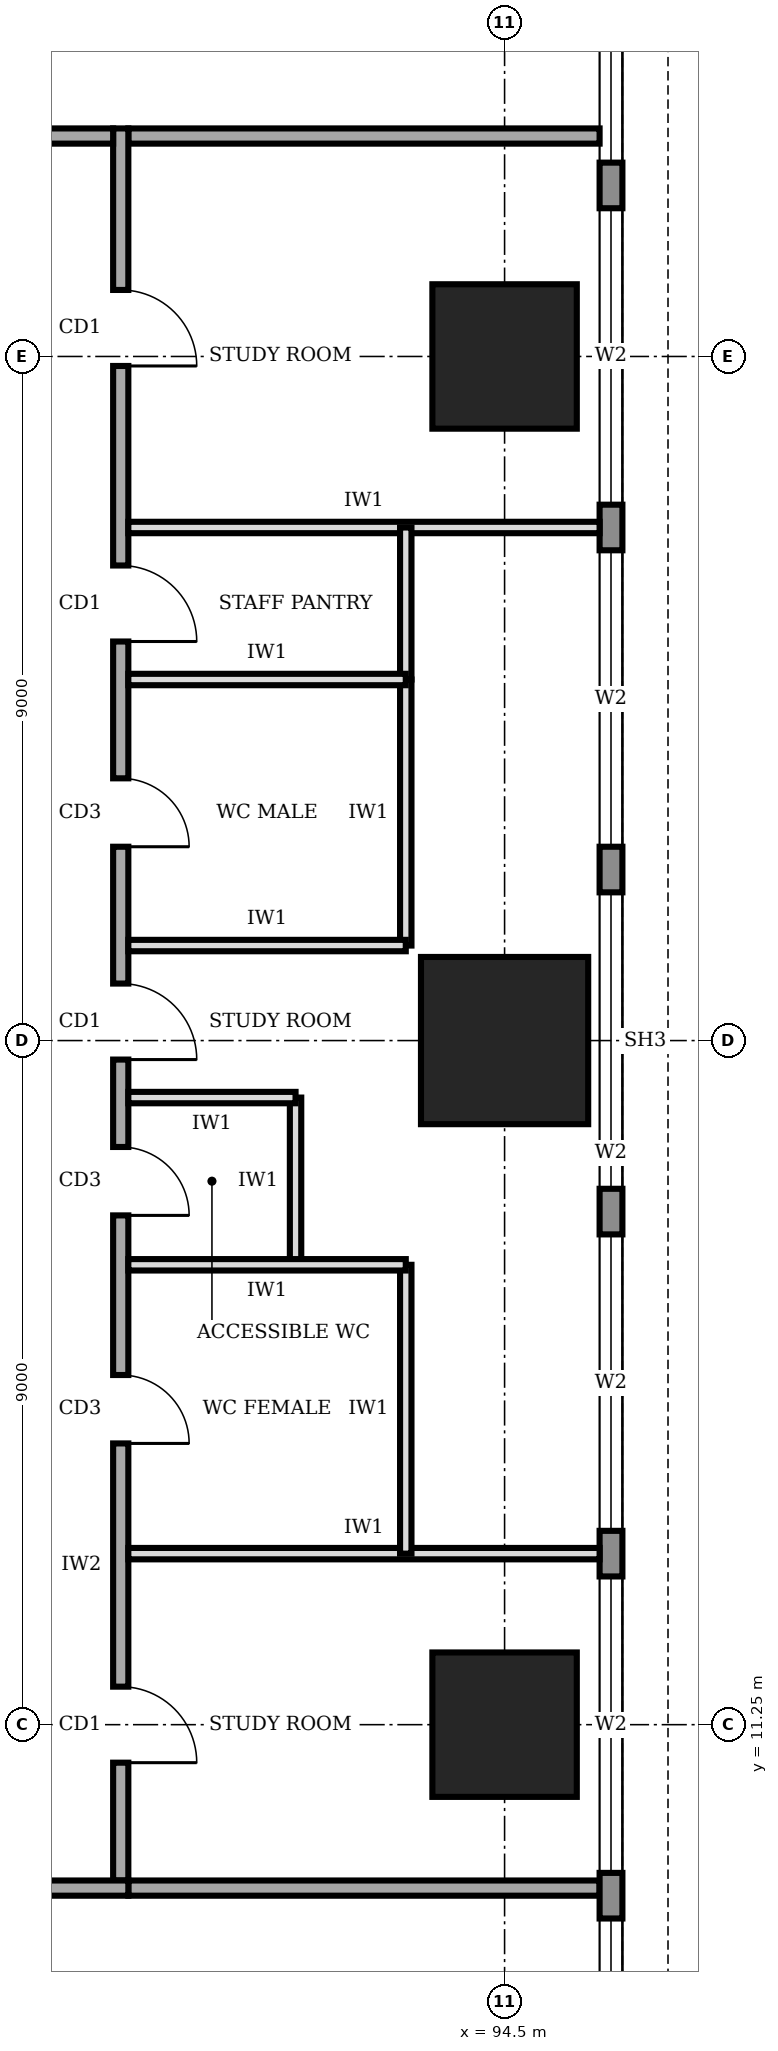
"""IFC4 building model, lengths in metres.
Left out: names, types, materials, properties, quantities, classifications, styles, units other than length and angle.
Written with IfcOpenShell. Run it as: python <this file> out.ifc"""

import sys

from ifc_helpers import new_model, si_unit, direction, frame, frame_2d, origin, origin_2d, place, context, subcontext, project, spatial, rectangle, extrude, element, fill, save


model = new_model("IFC4")
c1 = context("Model", 3, precision=1e-05, world=origin(), true_north=direction((0.0, 1.0)))
c2 = subcontext(c1, "Body", "Model", "MODEL_VIEW")
j1 = project(units=[si_unit("LENGTHUNIT", "METRE"), si_unit("PLANEANGLEUNIT", "RADIAN")], contexts=[c1])
p1 = place(None, origin())
s1 = spatial("IfcSite", under=j1, at=p1, CompositionType="ELEMENT")
p2 = place(p1, origin())
s2 = spatial("IfcBuilding", under=s1, at=p2, CompositionType="ELEMENT")
p3 = place(p2, frame((0.0, 0.0, 161.0)))
s3 = spatial("IfcBuildingStorey", under=s2, at=p3, CompositionType="ELEMENT", Elevation=161.0)
p4 = place(p3, frame((94.5, 11.25, 0.0), z_axis=(0.0, 0.0, 1.0), x_axis=(1.0, 0.0, 0.0)))
e1 = element("IfcColumn", 1, at=p4, inside=s3, PredefinedType="COLUMN", context=c2, shape_type="SweptSolid", body=[
    extrude(rectangle(XDim=1.9, YDim=1.9, at=origin_2d()), origin(), (0.0, 0.0, 1.0), 4.0),
])
p5 = place(p3, frame((94.5, 20.25, 0.0), z_axis=(0.0, 0.0, 1.0), x_axis=(1.0, 0.0, 0.0)))
e2 = element("IfcColumn", 2, at=p5, inside=s3, PredefinedType="COLUMN", context=c2, shape_type="SweptSolid", body=[
    extrude(rectangle(XDim=2.2, YDim=2.2, at=origin_2d()), origin(), (0.0, 0.0, 1.0), 4.0),
])
p6 = place(p3, frame((94.5, 29.25, 0.0), z_axis=(0.0, 0.0, 1.0), x_axis=(1.0, 0.0, 0.0)))
e3 = element("IfcColumn", 3, at=p6, inside=s3, PredefinedType="COLUMN", context=c2, shape_type="SweptSolid", body=[
    extrude(rectangle(XDim=1.9, YDim=1.9, at=origin_2d()), origin(), (0.0, 0.0, 1.0), 4.0),
])
p7 = place(p3, frame((95.9, 3.32, 0.0), z_axis=(0.0, 0.0, 1.0), x_axis=(0.0, 1.0, 0.0)))
e4 = element("IfcWall", 4, at=p7, inside=s3, PredefinedType="STANDARD", context=c2, shape_type="SweptSolid", body=[
    extrude(rectangle(XDim=33.86, YDim=0.3, at=frame_2d((16.93, 0.0))), origin(), (0.0, 0.0, 1.0), 3.75),
])
p8 = place(p7, frame((1.48, 0.0, 0.6)))
e5 = element("IfcOpeningElement", 5, at=p8, cuts=e4, PredefinedType="OPENING", context=c2, shape_type="SweptSolid", body=[
    extrude(rectangle(XDim=3.9, YDim=2.6, at=frame_2d((1.95, 1.3))), frame((0.0, 0.16, 0.0), z_axis=(0.0, -1.0, 0.0), x_axis=(1.0, 0.0, 0.0)), (0.0, 0.0, 1.0), 0.32),
])
p9 = place(p7, frame((5.98, 0.0, 0.6)))
e6 = element("IfcOpeningElement", 6, at=p9, cuts=e4, PredefinedType="OPENING", context=c2, shape_type="SweptSolid", body=[
    extrude(rectangle(XDim=3.9, YDim=2.6, at=frame_2d((1.95, 1.3))), frame((0.0, 0.16, 0.0), z_axis=(0.0, -1.0, 0.0), x_axis=(1.0, 0.0, 0.0)), (0.0, 0.0, 1.0), 0.32),
])
p10 = place(p7, frame((10.48, 0.0, 0.6)))
e7 = element("IfcOpeningElement", 7, at=p10, cuts=e4, PredefinedType="OPENING", context=c2, shape_type="SweptSolid", body=[
    extrude(rectangle(XDim=3.9, YDim=2.6, at=frame_2d((1.95, 1.3))), frame((0.0, 0.16, 0.0), z_axis=(0.0, -1.0, 0.0), x_axis=(1.0, 0.0, 0.0)), (0.0, 0.0, 1.0), 0.32),
])
p11 = place(p7, frame((14.98, 0.0, 0.6)))
e8 = element("IfcOpeningElement", 8, at=p11, cuts=e4, PredefinedType="OPENING", context=c2, shape_type="SweptSolid", body=[
    extrude(rectangle(XDim=3.9, YDim=2.6, at=frame_2d((1.95, 1.3))), frame((0.0, 0.16, 0.0), z_axis=(0.0, -1.0, 0.0), x_axis=(1.0, 0.0, 0.0)), (0.0, 0.0, 1.0), 0.32),
])
p12 = place(p7, frame((19.48, 0.0, 0.6)))
e9 = element("IfcOpeningElement", 9, at=p12, cuts=e4, PredefinedType="OPENING", context=c2, shape_type="SweptSolid", body=[
    extrude(rectangle(XDim=3.9, YDim=2.6, at=frame_2d((1.95, 1.3))), frame((0.0, 0.16, 0.0), z_axis=(0.0, -1.0, 0.0), x_axis=(1.0, 0.0, 0.0)), (0.0, 0.0, 1.0), 0.32),
])
p13 = place(p7, frame((23.98, 0.0, 0.6)))
e10 = element("IfcOpeningElement", 10, at=p13, cuts=e4, PredefinedType="OPENING", context=c2, shape_type="SweptSolid", body=[
    extrude(rectangle(XDim=3.9, YDim=2.6, at=frame_2d((1.95, 1.3))), frame((0.0, 0.16, 0.0), z_axis=(0.0, -1.0, 0.0), x_axis=(1.0, 0.0, 0.0)), (0.0, 0.0, 1.0), 0.32),
])
p14 = place(p7, frame((28.48, 0.0, 0.6)))
e11 = element("IfcOpeningElement", 11, at=p14, cuts=e4, PredefinedType="OPENING", context=c2, shape_type="SweptSolid", body=[
    extrude(rectangle(XDim=3.9, YDim=2.6, at=frame_2d((1.95, 1.3))), frame((0.0, 0.16, 0.0), z_axis=(0.0, -1.0, 0.0), x_axis=(1.0, 0.0, 0.0)), (0.0, 0.0, 1.0), 0.32),
])
p15 = place(p3, frame((63.3, 9.1, 0.0), z_axis=(0.0, 0.0, 1.0), x_axis=(1.0, 0.0, 0.0)))
e12 = element("IfcWall", 12, at=p15, inside=s3, PredefinedType="SOLIDWALL", context=c2, shape_type="SweptSolid", body=[
    extrude(rectangle(XDim=26.25, YDim=0.2, at=frame_2d((13.125, 0.0))), origin(), (0.0, 0.0, 1.0), 3.75),
])
p16 = place(p15, frame((12.425, 0.0, 0.0)))
e13 = element("IfcOpeningElement", 13, at=p16, cuts=e12, PredefinedType="OPENING", context=c2, shape_type="SweptSolid", body=[
    extrude(rectangle(XDim=1.4, YDim=2.1, at=frame_2d((0.7, 1.05))), frame((0.0, 0.11, 0.0), z_axis=(0.0, -1.0, 0.0), x_axis=(1.0, 0.0, 0.0)), (0.0, 0.0, 1.0), 0.22),
])
p17 = place(p3, frame((89.45, 9.2, 0.0), z_axis=(0.0, 0.0, 1.0), x_axis=(0.0, 1.0, 0.0)))
e14 = element("IfcWall", 14, at=p17, inside=s3, PredefinedType="SOLIDWALL", context=c2, shape_type="SweptSolid", body=[
    extrude(rectangle(XDim=23.05, YDim=0.2, at=frame_2d((11.525, 0.0))), origin(), (0.0, 0.0, 1.0), 3.75),
])
p18 = place(p17, frame((1.55, 0.0, 0.0)))
e15 = element("IfcOpeningElement", 15, at=p18, cuts=e14, PredefinedType="OPENING", context=c2, shape_type="SweptSolid", body=[
    extrude(rectangle(XDim=1.0, YDim=2.1, at=frame_2d((0.5, 1.05))), frame((0.0, 0.11, 0.0), z_axis=(0.0, -1.0, 0.0), x_axis=(1.0, 0.0, 0.0)), (0.0, 0.0, 1.0), 0.22),
])
p19 = place(p17, frame((5.75, 0.0, 0.0)))
e16 = element("IfcOpeningElement", 16, at=p19, cuts=e14, PredefinedType="OPENING", context=c2, shape_type="SweptSolid", body=[
    extrude(rectangle(XDim=0.9, YDim=2.1, at=frame_2d((0.45, 1.05))), frame((0.0, 0.11, 0.0), z_axis=(0.0, -1.0, 0.0), x_axis=(1.0, 0.0, 0.0)), (0.0, 0.0, 1.0), 0.22),
])
p20 = place(p17, frame((8.75, 0.0, 0.0)))
e17 = element("IfcOpeningElement", 17, at=p20, cuts=e14, PredefinedType="OPENING", context=c2, shape_type="SweptSolid", body=[
    extrude(rectangle(XDim=0.9, YDim=2.1, at=frame_2d((0.45, 1.05))), frame((0.0, 0.11, 0.0), z_axis=(0.0, -1.0, 0.0), x_axis=(1.0, 0.0, 0.0)), (0.0, 0.0, 1.0), 0.22),
])
p21 = place(p17, frame((13.6, 0.0, 0.0)))
e18 = element("IfcOpeningElement", 18, at=p21, cuts=e14, PredefinedType="OPENING", context=c2, shape_type="SweptSolid", body=[
    extrude(rectangle(XDim=0.9, YDim=2.1, at=frame_2d((0.45, 1.05))), frame((0.0, 0.11, 0.0), z_axis=(0.0, -1.0, 0.0), x_axis=(1.0, 0.0, 0.0)), (0.0, 0.0, 1.0), 0.22),
])
p22 = place(p17, frame((16.3, 0.0, 0.0)))
e19 = element("IfcOpeningElement", 19, at=p22, cuts=e14, PredefinedType="OPENING", context=c2, shape_type="SweptSolid", body=[
    extrude(rectangle(XDim=1.0, YDim=2.1, at=frame_2d((0.5, 1.05))), frame((0.0, 0.11, 0.0), z_axis=(0.0, -1.0, 0.0), x_axis=(1.0, 0.0, 0.0)), (0.0, 0.0, 1.0), 0.22),
])
p23 = place(p17, frame((10.8, 0.0, 0.0)))
e20 = element("IfcOpeningElement", 20, at=p23, cuts=e14, PredefinedType="OPENING", context=c2, shape_type="SweptSolid", body=[
    extrude(rectangle(XDim=1.0, YDim=2.1, at=frame_2d((0.5, 1.05))), frame((0.0, 0.11, 0.0), z_axis=(0.0, -1.0, 0.0), x_axis=(1.0, 0.0, 0.0)), (0.0, 0.0, 1.0), 0.22),
])
p24 = place(p17, frame((19.925, 0.0, 0.0)))
e21 = element("IfcOpeningElement", 21, at=p24, cuts=e14, PredefinedType="OPENING", context=c2, shape_type="SweptSolid", body=[
    extrude(rectangle(XDim=1.0, YDim=2.1, at=frame_2d((0.5, 1.05))), frame((0.0, 0.11, 0.0), z_axis=(0.0, -1.0, 0.0), x_axis=(1.0, 0.0, 0.0)), (0.0, 0.0, 1.0), 0.22),
])
p25 = place(p3, frame((89.35, 32.15, 0.0), z_axis=(0.0, 0.0, 1.0), x_axis=(-1.0, 0.0, 0.0)))
e22 = element("IfcWall", 22, at=p25, inside=s3, PredefinedType="SOLIDWALL", context=c2, shape_type="SweptSolid", body=[
    extrude(rectangle(XDim=26.05, YDim=0.2, at=frame_2d((13.025, 0.0))), origin(), (0.0, 0.0, 1.0), 3.75),
])
p26 = place(p25, frame((19.05, 0.0, 0.0)))
e23 = element("IfcOpeningElement", 23, at=p26, cuts=e22, PredefinedType="OPENING", context=c2, shape_type="SweptSolid", body=[
    extrude(rectangle(XDim=1.0, YDim=2.1, at=frame_2d((0.5, 1.05))), frame((0.0, 0.11, 0.0), z_axis=(0.0, -1.0, 0.0), x_axis=(1.0, 0.0, 0.0)), (0.0, 0.0, 1.0), 0.22),
])
p27 = place(p25, frame((10.1, 0.0, 0.0)))
e24 = element("IfcOpeningElement", 24, at=p27, cuts=e22, PredefinedType="OPENING", context=c2, shape_type="SweptSolid", body=[
    extrude(rectangle(XDim=1.0, YDim=2.1, at=frame_2d((0.5, 1.05))), frame((0.0, 0.11, 0.0), z_axis=(0.0, -1.0, 0.0), x_axis=(1.0, 0.0, 0.0)), (0.0, 0.0, 1.0), 0.22),
])
p28 = place(p25, frame((5.6, 0.0, 0.0)))
e25 = element("IfcOpeningElement", 25, at=p28, cuts=e22, PredefinedType="OPENING", context=c2, shape_type="SweptSolid", body=[
    extrude(rectangle(XDim=1.0, YDim=2.1, at=frame_2d((0.5, 1.05))), frame((0.0, 0.11, 0.0), z_axis=(0.0, -1.0, 0.0), x_axis=(1.0, 0.0, 0.0)), (0.0, 0.0, 1.0), 0.22),
])
p29 = place(p25, frame((1.325, 0.0, 0.0)))
e26 = element("IfcOpeningElement", 26, at=p29, cuts=e22, PredefinedType="OPENING", context=c2, shape_type="SweptSolid", body=[
    extrude(rectangle(XDim=1.0, YDim=2.1, at=frame_2d((0.5, 1.05))), frame((0.0, 0.11, 0.0), z_axis=(0.0, -1.0, 0.0), x_axis=(1.0, 0.0, 0.0)), (0.0, 0.0, 1.0), 0.22),
])
for number, where, z_axis, x_axis in (
    (27, (89.55, 9.1, 0.0), (0.0, 0.0, 1.0), (1.0, 0.0, 0.0)),
    (28, (89.55, 32.15, 0.0), (0.0, 0.0, 1.0), (1.0, 0.0, 0.0)),
):
    element("IfcWall", number, at=place(p3, frame(where, z_axis=z_axis, x_axis=x_axis)), inside=s3, PredefinedType="SOLIDWALL", context=c2, shape_type="SweptSolid", body=[
        extrude(rectangle(XDim=6.2, YDim=0.2, at=frame_2d((3.1, 0.0))), origin(), (0.0, 0.0, 1.0), 3.75),
    ])
for number, where, z_axis, x_axis in (
    (29, (89.55, 13.5, 0.0), (0.0, 0.0, 1.0), (1.0, 0.0, 0.0)),
    (30, (89.55, 27.0, 0.0), (0.0, 0.0, 1.0), (1.0, 0.0, 0.0)),
):
    element("IfcWall", number, at=place(p3, frame(where, z_axis=z_axis, x_axis=x_axis)), inside=s3, PredefinedType="PARTITIONING", context=c2, shape_type="SweptSolid", body=[
        extrude(rectangle(XDim=6.2, YDim=0.15, at=frame_2d((3.1, 0.0))), origin(), (0.0, 0.0, 1.0), 3.75),
    ])
p30 = place(p3, frame((89.55, 17.3, 0.0), z_axis=(0.0, 0.0, 1.0), x_axis=(1.0, 0.0, 0.0)))
e31 = element("IfcWall", 31, at=p30, inside=s3, PredefinedType="PARTITIONING", context=c2, shape_type="SweptSolid", body=[
    extrude(rectangle(XDim=3.65, YDim=0.15, at=frame_2d((1.825, 0.0))), origin(), (0.0, 0.0, 1.0), 3.75),
])
p31 = place(p3, frame((89.55, 19.5, 0.0), z_axis=(0.0, 0.0, 1.0), x_axis=(1.0, 0.0, 0.0)))
e32 = element("IfcWall", 32, at=p31, inside=s3, PredefinedType="PARTITIONING", context=c2, shape_type="SweptSolid", body=[
    extrude(rectangle(XDim=2.2, YDim=0.15, at=frame_2d((1.1, 0.0))), origin(), (0.0, 0.0, 1.0), 2.85),
])
for number, where, z_axis, x_axis in (
    (33, (89.55, 21.5, 0.0), (0.0, 0.0, 1.0), (1.0, 0.0, 0.0)),
    (34, (89.55, 25.0, 0.0), (0.0, 0.0, 1.0), (1.0, 0.0, 0.0)),
):
    element("IfcWall", number, at=place(p3, frame(where, z_axis=z_axis, x_axis=x_axis)), inside=s3, PredefinedType="PARTITIONING", context=c2, shape_type="SweptSolid", body=[
        extrude(rectangle(XDim=3.65, YDim=0.15, at=frame_2d((1.825, 0.0))), origin(), (0.0, 0.0, 1.0), 3.75),
    ])
p32 = place(p3, frame((93.2, 13.5, 0.0), z_axis=(0.0, 0.0, 1.0), x_axis=(0.0, 1.0, 0.0)))
e35 = element("IfcWall", 35, at=p32, inside=s3, PredefinedType="PARTITIONING", context=c2, shape_type="SweptSolid", body=[
    extrude(rectangle(XDim=3.8, YDim=0.15, at=frame_2d((1.9, 0.0))), origin(), (0.0, 0.0, 1.0), 3.75),
])
p33 = place(p3, frame((91.75, 17.3, 0.0), z_axis=(0.0, 0.0, 1.0), x_axis=(0.0, 1.0, 0.0)))
e36 = element("IfcWall", 36, at=p33, inside=s3, PredefinedType="PARTITIONING", context=c2, shape_type="SweptSolid", body=[
    extrude(rectangle(XDim=2.2, YDim=0.15, at=frame_2d((1.1, 0.0))), origin(), (0.0, 0.0, 1.0), 3.75),
])
p34 = place(p3, frame((93.2, 21.5, 0.0), z_axis=(0.0, 0.0, 1.0), x_axis=(0.0, 1.0, 0.0)))
e37 = element("IfcWall", 37, at=p34, inside=s3, PredefinedType="PARTITIONING", context=c2, shape_type="SweptSolid", body=[
    extrude(rectangle(XDim=3.5, YDim=0.15, at=frame_2d((1.75, 0.0))), origin(), (0.0, 0.0, 1.0), 3.75),
])
p35 = place(p3, frame((93.2, 25.0, 0.0), z_axis=(0.0, 0.0, 1.0), x_axis=(0.0, 1.0, 0.0)))
e38 = element("IfcWall", 38, at=p35, inside=s3, PredefinedType="PARTITIONING", context=c2, shape_type="SweptSolid", body=[
    extrude(rectangle(XDim=2.0, YDim=0.15, at=frame_2d((1.0, 0.0))), origin(), (0.0, 0.0, 1.0), 3.75),
])
p36 = place(p8, origin())
e39 = element("IfcWindow", 39, at=p36, inside=s3, PartitioningType="SINGLE_PANEL", PredefinedType="WINDOW", context=c2, shape_type="SweptSolid", body=[
    extrude(rectangle(XDim=3.9, YDim=2.6, at=frame_2d((1.95, 1.3))), frame((0.0, 0.03, 0.0), z_axis=(0.0, -1.0, 0.0), x_axis=(1.0, 0.0, 0.0)), (0.0, 0.0, 1.0), 0.06),
])
fill(e5, e39)
p37 = place(p9, origin())
e40 = element("IfcWindow", 40, at=p37, inside=s3, PartitioningType="SINGLE_PANEL", PredefinedType="WINDOW", context=c2, shape_type="SweptSolid", body=[
    extrude(rectangle(XDim=3.9, YDim=2.6, at=frame_2d((1.95, 1.3))), frame((0.0, 0.03, 0.0), z_axis=(0.0, -1.0, 0.0), x_axis=(1.0, 0.0, 0.0)), (0.0, 0.0, 1.0), 0.06),
])
fill(e6, e40)
p38 = place(p10, origin())
e41 = element("IfcWindow", 41, at=p38, inside=s3, PartitioningType="SINGLE_PANEL", PredefinedType="WINDOW", context=c2, shape_type="SweptSolid", body=[
    extrude(rectangle(XDim=3.9, YDim=2.6, at=frame_2d((1.95, 1.3))), frame((0.0, 0.03, 0.0), z_axis=(0.0, -1.0, 0.0), x_axis=(1.0, 0.0, 0.0)), (0.0, 0.0, 1.0), 0.06),
])
fill(e7, e41)
p39 = place(p11, origin())
e42 = element("IfcWindow", 42, at=p39, inside=s3, PartitioningType="SINGLE_PANEL", PredefinedType="WINDOW", context=c2, shape_type="SweptSolid", body=[
    extrude(rectangle(XDim=3.9, YDim=2.6, at=frame_2d((1.95, 1.3))), frame((0.0, 0.03, 0.0), z_axis=(0.0, -1.0, 0.0), x_axis=(1.0, 0.0, 0.0)), (0.0, 0.0, 1.0), 0.06),
])
fill(e8, e42)
p40 = place(p12, origin())
e43 = element("IfcWindow", 43, at=p40, inside=s3, PartitioningType="SINGLE_PANEL", PredefinedType="WINDOW", context=c2, shape_type="SweptSolid", body=[
    extrude(rectangle(XDim=3.9, YDim=2.6, at=frame_2d((1.95, 1.3))), frame((0.0, 0.03, 0.0), z_axis=(0.0, -1.0, 0.0), x_axis=(1.0, 0.0, 0.0)), (0.0, 0.0, 1.0), 0.06),
])
fill(e9, e43)
p41 = place(p13, origin())
e44 = element("IfcWindow", 44, at=p41, inside=s3, PartitioningType="SINGLE_PANEL", PredefinedType="WINDOW", context=c2, shape_type="SweptSolid", body=[
    extrude(rectangle(XDim=3.9, YDim=2.6, at=frame_2d((1.95, 1.3))), frame((0.0, 0.03, 0.0), z_axis=(0.0, -1.0, 0.0), x_axis=(1.0, 0.0, 0.0)), (0.0, 0.0, 1.0), 0.06),
])
fill(e10, e44)
p42 = place(p14, origin())
e45 = element("IfcWindow", 45, at=p42, inside=s3, PartitioningType="SINGLE_PANEL", PredefinedType="WINDOW", context=c2, shape_type="SweptSolid", body=[
    extrude(rectangle(XDim=3.9, YDim=2.6, at=frame_2d((1.95, 1.3))), frame((0.0, 0.03, 0.0), z_axis=(0.0, -1.0, 0.0), x_axis=(1.0, 0.0, 0.0)), (0.0, 0.0, 1.0), 0.06),
])
fill(e11, e45)
p43 = place(p18, frame((1.0, 0.0, 0.0), z_axis=(0.0, 0.0, 1.0), x_axis=(-1.0, 0.0, 0.0)))
e46 = element("IfcDoor", 46, at=p43, inside=s3, OperationType="SINGLE_SWING_RIGHT", PredefinedType="DOOR", context=c2, shape_type="SweptSolid", body=[
    extrude(rectangle(XDim=1.0, YDim=2.1, at=frame_2d((0.5, 1.05))), frame((0.0, 0.025, 0.0), z_axis=(0.0, -1.0, 0.0), x_axis=(1.0, 0.0, 0.0)), (0.0, 0.0, 1.0), 0.05),
])
fill(e15, e46)
p44 = place(p19, frame((0.9, 0.0, 0.0), z_axis=(0.0, 0.0, 1.0), x_axis=(-1.0, 0.0, 0.0)))
e47 = element("IfcDoor", 47, at=p44, inside=s3, OperationType="SINGLE_SWING_RIGHT", PredefinedType="DOOR", context=c2, shape_type="SweptSolid", body=[
    extrude(rectangle(XDim=0.9, YDim=2.1, at=frame_2d((0.45, 1.05))), frame((0.0, 0.025, 0.0), z_axis=(0.0, -1.0, 0.0), x_axis=(1.0, 0.0, 0.0)), (0.0, 0.0, 1.0), 0.05),
])
fill(e16, e47)
p45 = place(p20, frame((0.9, 0.0, 0.0), z_axis=(0.0, 0.0, 1.0), x_axis=(-1.0, 0.0, 0.0)))
e48 = element("IfcDoor", 48, at=p45, inside=s3, OperationType="SINGLE_SWING_RIGHT", PredefinedType="DOOR", context=c2, shape_type="SweptSolid", body=[
    extrude(rectangle(XDim=0.9, YDim=2.1, at=frame_2d((0.45, 1.05))), frame((0.0, 0.025, 0.0), z_axis=(0.0, -1.0, 0.0), x_axis=(1.0, 0.0, 0.0)), (0.0, 0.0, 1.0), 0.05),
])
fill(e17, e48)
p46 = place(p21, frame((0.9, 0.0, 0.0), z_axis=(0.0, 0.0, 1.0), x_axis=(-1.0, 0.0, 0.0)))
e49 = element("IfcDoor", 49, at=p46, inside=s3, OperationType="SINGLE_SWING_RIGHT", PredefinedType="DOOR", context=c2, shape_type="SweptSolid", body=[
    extrude(rectangle(XDim=0.9, YDim=2.1, at=frame_2d((0.45, 1.05))), frame((0.0, 0.025, 0.0), z_axis=(0.0, -1.0, 0.0), x_axis=(1.0, 0.0, 0.0)), (0.0, 0.0, 1.0), 0.05),
])
fill(e18, e49)
p47 = place(p22, frame((1.0, 0.0, 0.0), z_axis=(0.0, 0.0, 1.0), x_axis=(-1.0, 0.0, 0.0)))
e50 = element("IfcDoor", 50, at=p47, inside=s3, OperationType="SINGLE_SWING_RIGHT", PredefinedType="DOOR", context=c2, shape_type="SweptSolid", body=[
    extrude(rectangle(XDim=1.0, YDim=2.1, at=frame_2d((0.5, 1.05))), frame((0.0, 0.025, 0.0), z_axis=(0.0, -1.0, 0.0), x_axis=(1.0, 0.0, 0.0)), (0.0, 0.0, 1.0), 0.05),
])
fill(e19, e50)
p48 = place(p23, frame((1.0, 0.0, 0.0), z_axis=(0.0, 0.0, 1.0), x_axis=(-1.0, 0.0, 0.0)))
e51 = element("IfcDoor", 51, at=p48, inside=s3, OperationType="SINGLE_SWING_RIGHT", PredefinedType="DOOR", context=c2, shape_type="SweptSolid", body=[
    extrude(rectangle(XDim=1.0, YDim=2.1, at=frame_2d((0.5, 1.05))), frame((0.0, 0.025, 0.0), z_axis=(0.0, -1.0, 0.0), x_axis=(1.0, 0.0, 0.0)), (0.0, 0.0, 1.0), 0.05),
])
fill(e20, e51)
p49 = place(p24, frame((1.0, 0.0, 0.0), z_axis=(0.0, 0.0, 1.0), x_axis=(-1.0, 0.0, 0.0)))
e52 = element("IfcDoor", 52, at=p49, inside=s3, OperationType="SINGLE_SWING_RIGHT", PredefinedType="DOOR", context=c2, shape_type="SweptSolid", body=[
    extrude(rectangle(XDim=1.0, YDim=2.1, at=frame_2d((0.5, 1.05))), frame((0.0, 0.025, 0.0), z_axis=(0.0, -1.0, 0.0), x_axis=(1.0, 0.0, 0.0)), (0.0, 0.0, 1.0), 0.05),
])
fill(e21, e52)
save(model, sys.argv[1])
